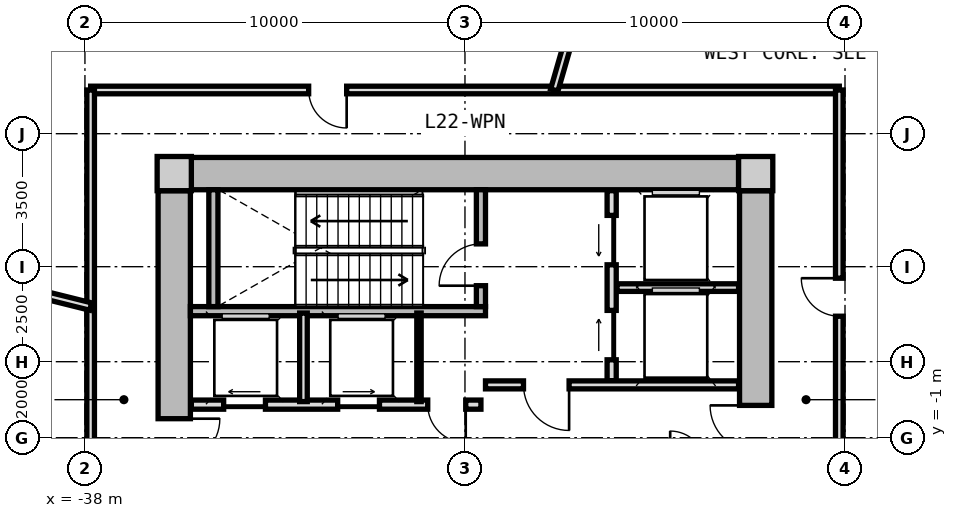
"""IFC4 building model, lengths in metres.
Left out: names, types, materials, properties, quantities, classifications, styles, units other than length and angle.
Written with IfcOpenShell. Run it as: python <this file> out.ifc"""

import sys

from ifc_helpers import new_model, si_unit, direction, frame, frame_2d, origin, origin_2d, place, context, subcontext, project, spatial, rectangle, extrude, source, transform, mapped, element, fill, save


model = new_model("IFC4")
c1 = context("Model", 3, precision=1e-05, world=origin(), true_north=direction((0.0, 1.0)))
c2 = subcontext(c1, "Body", "Model", "MODEL_VIEW")
j1 = project(units=[si_unit("LENGTHUNIT", "METRE"), si_unit("PLANEANGLEUNIT", "RADIAN")], contexts=[c1])
p1 = place(None, origin())
s1 = spatial("IfcSite", under=j1, at=p1, CompositionType="ELEMENT")
p2 = place(p1, origin())
s2 = spatial("IfcBuilding", under=s1, at=p2, CompositionType="ELEMENT")
p3 = place(p2, frame((0.0, 0.0, 73.45)))
s3 = spatial("IfcBuildingStorey", under=s2, at=p3, CompositionType="ELEMENT", Elevation=73.45)
m1 = source(origin(), c2, "Body", "SweptSolid", [
    extrude(rectangle(XDim=0.9, YDim=0.9, at=origin_2d()), origin(), (0.0, 0.0, 1.0), 4.5),
])
for number, where, z_axis, x_axis in (
    (1, (-20.35, 5.95, 0.0), (0.0, 0.0, 1.0), (1.0, 0.0, 0.0)),
    (2, (-35.65, 5.95, 0.0), (0.0, 0.0, 1.0), (1.0, 0.0, 0.0)),
):
    element("IfcColumn", number, at=place(p3, frame(where, z_axis=z_axis, x_axis=x_axis)), inside=s3, PredefinedType="COLUMN", context=c2, shape_type="MappedRepresentation", body=[
        mapped(m1, transform((0.0, 0.0, 0.0), x_axis=(1.0, 0.0, 0.0), y_axis=(0.0, 1.0, 0.0), z_axis=(0.0, 0.0, 1.0), scale=1.0)),
    ])
m2 = source(origin(), c2, "Body", "SweptSolid", [
    extrude(rectangle(XDim=14.4, YDim=0.85, at=frame_2d((7.2, 0.0))), origin(), (0.0, 0.0, 1.0), 4.08),
])
p4 = place(p3, frame((-35.2, 5.95, 0.0), z_axis=(0.0, 0.0, 1.0), x_axis=(1.0, 0.0, 0.0)))
e3 = element("IfcWall", 3, at=p4, inside=s3, PredefinedType="SHEAR", context=c2, shape_type="MappedRepresentation", body=[
    mapped(m2, transform((0.0, 0.0, 0.0), x_axis=(1.0, 0.0, 0.0), y_axis=(0.0, 1.0, 0.0), z_axis=(0.0, 0.0, 1.0), scale=1.0)),
])
m3 = source(origin(), c2, "Body", "SweptSolid", [
    extrude(rectangle(XDim=11.0, YDim=0.85, at=frame_2d((5.5, 0.0))), origin(), (0.0, 0.0, 1.0), 4.08),
])
p5 = place(p3, frame((-35.65, -5.5, 0.0), z_axis=(0.0, 0.0, 1.0), x_axis=(0.0, 1.0, 0.0)))
e4 = element("IfcWall", 4, at=p5, inside=s3, PredefinedType="SHEAR", context=c2, shape_type="MappedRepresentation", body=[
    mapped(m3, transform((0.0, 0.0, 0.0), x_axis=(1.0, 0.0, 0.0), y_axis=(0.0, 1.0, 0.0), z_axis=(0.0, 0.0, 1.0), scale=1.0)),
])
p6 = place(p5, frame((3.8, 0.0, 0.0)))
e5 = element("IfcOpeningElement", 5, at=p6, cuts=e4, PredefinedType="OPENING", context=c2, shape_type="SweptSolid", body=[
    extrude(rectangle(XDim=1.2, YDim=2.15, at=frame_2d((0.6, 1.075))), frame((0.0, 0.435, 0.0), z_axis=(0.0, -1.0, 0.0), x_axis=(1.0, 0.0, 0.0)), (0.0, 0.0, 1.0), 0.87),
])
p7 = place(p3, frame((-20.35, 5.5, 0.0), z_axis=(0.0, 0.0, 1.0), x_axis=(0.0, -1.0, 0.0)))
e6 = element("IfcWall", 6, at=p7, inside=s3, PredefinedType="SHEAR", context=c2, shape_type="MappedRepresentation", body=[
    mapped(m3, transform((0.0, 0.0, 0.0), x_axis=(1.0, 0.0, 0.0), y_axis=(0.0, 1.0, 0.0), z_axis=(0.0, 0.0, 1.0), scale=1.0)),
])
p8 = place(p7, frame((5.65, 0.0, 0.0)))
e7 = element("IfcOpeningElement", 7, at=p8, cuts=e6, PredefinedType="OPENING", context=c2, shape_type="SweptSolid", body=[
    extrude(rectangle(XDim=1.2, YDim=2.15, at=frame_2d((0.6, 1.075))), frame((0.0, 0.435, 0.0), z_axis=(0.0, -1.0, 0.0), x_axis=(1.0, 0.0, 0.0)), (0.0, 0.0, 1.0), 0.87),
])
p9 = place(p7, frame((9.3, 0.0, 0.0)))
e8 = element("IfcOpeningElement", 8, at=p9, cuts=e6, PredefinedType="OPENING", context=c2, shape_type="SweptSolid", body=[
    extrude(rectangle(XDim=1.0, YDim=2.1, at=frame_2d((0.5, 1.05))), frame((0.0, 0.435, 0.0), z_axis=(0.0, -1.0, 0.0), x_axis=(1.0, 0.0, 0.0)), (0.0, 0.0, 1.0), 0.87),
])
m4 = source(origin(), c2, "Body", "SweptSolid", [
    extrude(rectangle(XDim=7.765, YDim=0.24, at=frame_2d((3.883, 0.0))), origin(), (0.0, 0.0, 1.0), 4.08),
])
p10 = place(p3, frame((-35.225, 2.33, 0.0), z_axis=(0.0, 0.0, 1.0), x_axis=(1.0, 0.0, 0.0)))
e9 = element("IfcWall", 9, at=p10, inside=s3, PredefinedType="PARTITIONING", context=c2, shape_type="MappedRepresentation", body=[
    mapped(m4, transform((0.0, 0.0, 0.0), x_axis=(1.0, 0.0, 0.0), y_axis=(0.0, 1.0, 0.0), z_axis=(0.0, 0.0, 1.0), scale=1.0)),
])
m5 = source(origin(), c2, "Body", "SweptSolid", [
    extrude(rectangle(XDim=3.075, YDim=0.24, at=frame_2d((1.538, 0.0))), origin(), (0.0, 0.0, 1.0), 4.08),
])
p11 = place(p3, frame((-34.62, 2.45, 0.0), z_axis=(0.0, 0.0, 1.0), x_axis=(0.0, 1.0, 0.0)))
e10 = element("IfcWall", 10, at=p11, inside=s3, PredefinedType="PARTITIONING", context=c2, shape_type="MappedRepresentation", body=[
    mapped(m5, transform((0.0, 0.0, 0.0), x_axis=(1.0, 0.0, 0.0), y_axis=(0.0, 1.0, 0.0), z_axis=(0.0, 0.0, 1.0), scale=1.0)),
])
p12 = place(p3, frame((-27.58, 2.45, 0.0), z_axis=(0.0, 0.0, 1.0), x_axis=(0.0, 1.0, 0.0)))
e11 = element("IfcWall", 11, at=p12, inside=s3, PredefinedType="PARTITIONING", context=c2, shape_type="MappedRepresentation", body=[
    mapped(m5, transform((0.0, 0.0, 0.0), x_axis=(1.0, 0.0, 0.0), y_axis=(0.0, 1.0, 0.0), z_axis=(0.0, 0.0, 1.0), scale=1.0)),
])
p13 = place(p12, frame((0.55, 0.0, 0.0)))
e12 = element("IfcOpeningElement", 12, at=p13, cuts=e11, PredefinedType="OPENING", context=c2, shape_type="SweptSolid", body=[
    extrude(rectangle(XDim=1.1, YDim=2.15, at=frame_2d((0.55, 1.075))), frame((0.0, 0.13, 0.0), z_axis=(0.0, -1.0, 0.0), x_axis=(1.0, 0.0, 0.0)), (0.0, 0.0, 1.0), 0.26),
])
m6 = source(origin(), c2, "Body", "SweptSolid", [
    extrude(rectangle(XDim=5.0, YDim=0.24, at=frame_2d((2.5, 0.0))), origin(), (0.0, 0.0, 1.0), 4.065),
])
p14 = place(p3, frame((-24.14, 0.5, 0.0), z_axis=(0.0, 0.0, 1.0), x_axis=(0.0, 1.0, 0.0)))
e13 = element("IfcWall", 13, at=p14, inside=s3, PredefinedType="PARTITIONING", context=c2, shape_type="MappedRepresentation", body=[
    mapped(m6, transform((0.0, 0.0, 0.0), x_axis=(1.0, 0.0, 0.0), y_axis=(0.0, 1.0, 0.0), z_axis=(0.0, 0.0, 1.0), scale=1.0)),
])
p15 = place(p14, frame((3.05, 0.0, 0.0)))
e14 = element("IfcOpeningElement", 14, at=p15, cuts=e13, PredefinedType="OPENING", context=c2, shape_type="SweptSolid", body=[
    extrude(rectangle(XDim=1.3, YDim=2.2, at=frame_2d((0.65, 1.1))), frame((0.0, 0.13, 0.0), z_axis=(0.0, -1.0, 0.0), x_axis=(1.0, 0.0, 0.0)), (0.0, 0.0, 1.0), 0.26),
])
p16 = place(p14, frame((0.55, 0.0, 0.0)))
e15 = element("IfcOpeningElement", 15, at=p16, cuts=e13, PredefinedType="OPENING", context=c2, shape_type="SweptSolid", body=[
    extrude(rectangle(XDim=1.3, YDim=2.2, at=frame_2d((0.65, 1.1))), frame((0.0, 0.13, 0.0), z_axis=(0.0, -1.0, 0.0), x_axis=(1.0, 0.0, 0.0)), (0.0, 0.0, 1.0), 0.26),
])
m7 = source(origin(), c2, "Body", "SweptSolid", [
    extrude(rectangle(XDim=3.2, YDim=0.2, at=frame_2d((1.6, 0.0))), origin(), (0.0, 0.0, 1.0), 4.065),
])
p17 = place(p3, frame((-24.0, 2.95, 0.0), z_axis=(0.0, 0.0, 1.0), x_axis=(1.0, 0.0, 0.0)))
e16 = element("IfcWall", 16, at=p17, inside=s3, PredefinedType="PARTITIONING", context=c2, shape_type="MappedRepresentation", body=[
    mapped(m7, transform((0.0, 0.0, 0.0), x_axis=(1.0, 0.0, 0.0), y_axis=(0.0, 1.0, 0.0), z_axis=(0.0, 0.0, 1.0), scale=1.0)),
])
m8 = source(origin(), c2, "Body", "SweptSolid", [
    extrude(rectangle(XDim=6.66, YDim=0.21, at=frame_2d((3.33, 0.0))), origin(), (0.0, 0.0, 1.0), 4.065),
])
p18 = place(p3, frame((-27.46, 0.39, 0.0), z_axis=(0.0, 0.0, 1.0), x_axis=(1.0, 0.0, 0.0)))
e17 = element("IfcWall", 17, at=p18, inside=s3, PredefinedType="PARTITIONING", context=c2, shape_type="MappedRepresentation", body=[
    mapped(m8, transform((0.0, 0.0, 0.0), x_axis=(1.0, 0.0, 0.0), y_axis=(0.0, 1.0, 0.0), z_axis=(0.0, 0.0, 1.0), scale=1.0)),
])
p19 = place(p18, frame((1.0, 0.0, 0.0)))
e18 = element("IfcOpeningElement", 18, at=p19, cuts=e17, PredefinedType="OPENING", context=c2, shape_type="SweptSolid", body=[
    extrude(rectangle(XDim=1.2, YDim=2.15, at=frame_2d((0.6, 1.075))), frame((0.0, 0.115, 0.0), z_axis=(0.0, -1.0, 0.0), x_axis=(1.0, 0.0, 0.0)), (0.0, 0.0, 1.0), 0.23),
])
m9 = source(origin(), c2, "Body", "SweptSolid", [
    extrude(rectangle(XDim=7.62, YDim=0.24, at=frame_2d((3.81, 0.0))), origin(), (0.0, 0.0, 1.0), 4.065),
])
p20 = place(p3, frame((-35.2, -0.13, 0.0), z_axis=(0.0, 0.0, 1.0), x_axis=(1.0, 0.0, 0.0)))
e19 = element("IfcWall", 19, at=p20, inside=s3, PredefinedType="PARTITIONING", context=c2, shape_type="MappedRepresentation", body=[
    mapped(m9, transform((0.0, 0.0, 0.0), x_axis=(1.0, 0.0, 0.0), y_axis=(0.0, 1.0, 0.0), z_axis=(0.0, 0.0, 1.0), scale=1.0)),
])
p21 = place(p20, frame((6.22, 0.0, 0.0)))
e20 = element("IfcOpeningElement", 20, at=p21, cuts=e19, PredefinedType="OPENING", context=c2, shape_type="SweptSolid", body=[
    extrude(rectangle(XDim=1.0, YDim=2.1, at=frame_2d((0.5, 1.05))), frame((0.0, 0.13, 0.0), z_axis=(0.0, -1.0, 0.0), x_axis=(1.0, 0.0, 0.0)), (0.0, 0.0, 1.0), 0.26),
])
p22 = place(p20, frame((0.85, 0.0, 0.0)))
e21 = element("IfcOpeningElement", 21, at=p22, cuts=e19, PredefinedType="OPENING", context=c2, shape_type="SweptSolid", body=[
    extrude(rectangle(XDim=1.1, YDim=2.2, at=frame_2d((0.55, 1.1))), frame((0.0, 0.13, 0.0), z_axis=(0.0, -1.0, 0.0), x_axis=(1.0, 0.0, 0.0)), (0.0, 0.0, 1.0), 0.26),
])
p23 = place(p20, frame((3.85, 0.0, 0.0)))
e22 = element("IfcOpeningElement", 22, at=p23, cuts=e19, PredefinedType="OPENING", context=c2, shape_type="SweptSolid", body=[
    extrude(rectangle(XDim=1.1, YDim=2.2, at=frame_2d((0.55, 1.1))), frame((0.0, 0.13, 0.0), z_axis=(0.0, -1.0, 0.0), x_axis=(1.0, 0.0, 0.0)), (0.0, 0.0, 1.0), 0.26),
])
m10 = source(origin(), c2, "Body", "SweptSolid", [
    extrude(rectangle(XDim=2.33, YDim=0.115, at=frame_2d((1.165, 0.0))), origin(), (0.0, 0.0, 1.0), 4.065),
])
p24 = place(p3, frame((-29.21, -0.05, 0.0), z_axis=(0.0, 0.0, 1.0), x_axis=(0.0, 1.0, 0.0)))
e23 = element("IfcWall", 23, at=p24, inside=s3, PredefinedType="PARTITIONING", context=c2, shape_type="MappedRepresentation", body=[
    mapped(m10, transform((0.0, 0.0, 0.0), x_axis=(1.0, 0.0, 0.0), y_axis=(0.0, 1.0, 0.0), z_axis=(0.0, 0.0, 1.0), scale=1.0)),
])
m11 = source(origin(), c2, "Body", "SweptSolid", [
    extrude(rectangle(XDim=2.33, YDim=0.2, at=frame_2d((1.165, 0.0))), origin(), (0.0, 0.0, 1.0), 4.065),
])
p25 = place(p3, frame((-32.25, -0.05, 0.0), z_axis=(0.0, 0.0, 1.0), x_axis=(0.0, 1.0, 0.0)))
e24 = element("IfcWall", 24, at=p25, inside=s3, PredefinedType="PARTITIONING", context=c2, shape_type="MappedRepresentation", body=[
    mapped(m11, transform((0.0, 0.0, 0.0), x_axis=(1.0, 0.0, 0.0), y_axis=(0.0, 1.0, 0.0), z_axis=(0.0, 0.0, 1.0), scale=1.0)),
])
m12 = source(origin(), c2, "Body", "SweptSolid", [
    extrude(rectangle(XDim=19.7, YDim=0.2, at=frame_2d((9.85, 0.0))), origin(), (0.0, 0.0, 1.0), 4.065),
])
p26 = place(p3, frame((-37.85, 8.15, 0.0), z_axis=(0.0, 0.0, 1.0), x_axis=(1.0, 0.0, 0.0)))
e25 = element("IfcWall", 25, at=p26, inside=s3, PredefinedType="PARTITIONING", context=c2, shape_type="MappedRepresentation", body=[
    mapped(m12, transform((0.0, 0.0, 0.0), x_axis=(1.0, 0.0, 0.0), y_axis=(0.0, 1.0, 0.0), z_axis=(0.0, 0.0, 1.0), scale=1.0)),
])
p27 = place(p26, frame((5.737, 0.0, 0.0)))
e26 = element("IfcOpeningElement", 26, at=p27, cuts=e25, PredefinedType="OPENING", context=c2, shape_type="SweptSolid", body=[
    extrude(rectangle(XDim=1.0, YDim=2.1, at=frame_2d((0.5, 1.05))), frame((0.0, 0.11, 0.0), z_axis=(0.0, -1.0, 0.0), x_axis=(1.0, 0.0, 0.0)), (0.0, 0.0, 1.0), 0.22),
])
m13 = source(origin(), c2, "Body", "SweptSolid", [
    extrude(rectangle(XDim=16.3, YDim=0.2, at=frame_2d((8.15, 0.0))), origin(), (0.0, 0.0, 1.0), 4.065),
])
p28 = place(p3, frame((-37.85, -8.15, 0.0), z_axis=(0.0, 0.0, 1.0), x_axis=(0.0, 1.0, 0.0)))
e27 = element("IfcWall", 27, at=p28, inside=s3, PredefinedType="PARTITIONING", context=c2, shape_type="MappedRepresentation", body=[
    mapped(m13, transform((0.0, 0.0, 0.0), x_axis=(1.0, 0.0, 0.0), y_axis=(0.0, 1.0, 0.0), z_axis=(0.0, 0.0, 1.0), scale=1.0)),
])
p29 = place(p28, frame((4.953, 0.0, 0.0)))
e28 = element("IfcOpeningElement", 28, at=p29, cuts=e27, PredefinedType="OPENING", context=c2, shape_type="SweptSolid", body=[
    extrude(rectangle(XDim=1.0, YDim=2.1, at=frame_2d((0.5, 1.05))), frame((0.0, 0.11, 0.0), z_axis=(0.0, -1.0, 0.0), x_axis=(1.0, 0.0, 0.0)), (0.0, 0.0, 1.0), 0.22),
])
p30 = place(p3, frame((-18.15, 8.15, 0.0), z_axis=(0.0, 0.0, 1.0), x_axis=(0.0, -1.0, 0.0)))
e29 = element("IfcWall", 29, at=p30, inside=s3, PredefinedType="PARTITIONING", context=c2, shape_type="MappedRepresentation", body=[
    mapped(m13, transform((0.0, 0.0, 0.0), x_axis=(1.0, 0.0, 0.0), y_axis=(0.0, 1.0, 0.0), z_axis=(0.0, 0.0, 1.0), scale=1.0)),
])
p31 = place(p30, frame((4.953, 0.0, 0.0)))
e30 = element("IfcOpeningElement", 30, at=p31, cuts=e29, PredefinedType="OPENING", context=c2, shape_type="SweptSolid", body=[
    extrude(rectangle(XDim=1.0, YDim=2.1, at=frame_2d((0.5, 1.05))), frame((0.0, 0.11, 0.0), z_axis=(0.0, -1.0, 0.0), x_axis=(1.0, 0.0, 0.0)), (0.0, 0.0, 1.0), 0.22),
])
m14 = source(origin(), c2, "Body", "SweptSolid", [
    extrude(rectangle(XDim=9.915, YDim=0.2, at=frame_2d((4.958, 0.0))), origin(), (0.0, 0.0, 1.0), 4.065),
])
p32 = place(p3, frame((-25.649, 8.15, 0.0), z_axis=(0.0, 0.0, 1.0), x_axis=(0.277136607861, 0.960830526463, 0.0)))
e31 = element("IfcWall", 31, at=p32, inside=s3, PredefinedType="PARTITIONING", context=c2, shape_type="MappedRepresentation", body=[
    mapped(m14, transform((0.0, 0.0, 0.0), x_axis=(1.0, 0.0, 0.0), y_axis=(0.0, 1.0, 0.0), z_axis=(0.0, 0.0, 1.0), scale=1.0)),
])
m15 = source(origin(), c2, "Body", "SweptSolid", [
    extrude(rectangle(XDim=9.459, YDim=0.2, at=frame_2d((4.729, 0.0))), origin(), (0.0, 0.0, 1.0), 2.515),
])
p33 = place(p3, frame((-37.85, 2.452, 0.0), z_axis=(0.0, 0.0, 1.0), x_axis=(-0.970390989268, 0.241539495626, 0.0)))
e32 = element("IfcWall", 32, at=p33, inside=s3, PredefinedType="PARTITIONING", context=c2, shape_type="MappedRepresentation", body=[
    mapped(m15, transform((0.0, 0.0, 0.0), x_axis=(1.0, 0.0, 0.0), y_axis=(0.0, 1.0, 0.0), z_axis=(0.0, 0.0, 1.0), scale=1.0)),
])
m16 = source(origin(), c2, "Body", "SweptSolid", [
    extrude(rectangle(XDim=1.1, YDim=2.15, at=frame_2d((0.55, 1.075))), frame((0.0, 0.025, 0.0), z_axis=(0.0, -1.0, 0.0), x_axis=(1.0, 0.0, 0.0)), (0.0, 0.0, 1.0), 0.05),
])
p34 = place(p13, origin())
e33 = element("IfcDoor", 33, at=p34, inside=s3, OperationType="SINGLE_SWING_LEFT", PredefinedType="DOOR", context=c2, shape_type="MappedRepresentation", body=[
    mapped(m16, transform((0.0, 0.0, 0.0), x_axis=(1.0, 0.0, 0.0), y_axis=(0.0, 1.0, 0.0), z_axis=(0.0, 0.0, 1.0), scale=1.0)),
])
fill(e12, e33)
m17 = source(origin(), c2, "Body", "SweptSolid", [
    extrude(rectangle(XDim=1.3, YDim=2.2, at=frame_2d((0.65, 1.1))), frame((0.0, 0.025, 0.0), z_axis=(0.0, -1.0, 0.0), x_axis=(1.0, 0.0, 0.0)), (0.0, 0.0, 1.0), 0.05),
])
p35 = place(p15, origin())
e34 = element("IfcDoor", 34, at=p35, inside=s3, OperationType="SLIDING_TO_LEFT", PredefinedType="DOOR", context=c2, shape_type="MappedRepresentation", body=[
    mapped(m17, transform((0.0, 0.0, 0.0), x_axis=(1.0, 0.0, 0.0), y_axis=(0.0, 1.0, 0.0), z_axis=(0.0, 0.0, 1.0), scale=1.0)),
])
fill(e14, e34)
p36 = place(p16, origin())
e35 = element("IfcDoor", 35, at=p36, inside=s3, OperationType="SLIDING_TO_RIGHT", PredefinedType="DOOR", context=c2, shape_type="MappedRepresentation", body=[
    mapped(m17, transform((0.0, 0.0, 0.0), x_axis=(1.0, 0.0, 0.0), y_axis=(0.0, 1.0, 0.0), z_axis=(0.0, 0.0, 1.0), scale=1.0)),
])
fill(e15, e35)
m18 = source(origin(), c2, "Body", "SweptSolid", [
    extrude(rectangle(XDim=1.2, YDim=2.15, at=frame_2d((0.6, 1.075))), frame((0.0, 0.025, 0.0), z_axis=(0.0, -1.0, 0.0), x_axis=(1.0, 0.0, 0.0)), (0.0, 0.0, 1.0), 0.05),
])
p37 = place(p19, frame((1.2, 0.0, 0.0), z_axis=(0.0, 0.0, 1.0), x_axis=(-1.0, 0.0, 0.0)))
e36 = element("IfcDoor", 36, at=p37, inside=s3, OperationType="SINGLE_SWING_LEFT", PredefinedType="DOOR", context=c2, shape_type="MappedRepresentation", body=[
    mapped(m18, transform((0.0, 0.0, 0.0), x_axis=(1.0, 0.0, 0.0), y_axis=(0.0, 1.0, 0.0), z_axis=(0.0, 0.0, 1.0), scale=1.0)),
])
fill(e18, e36)
p38 = place(p6, frame((1.2, 0.0, 0.0), z_axis=(0.0, 0.0, 1.0), x_axis=(-1.0, 0.0, 0.0)))
e37 = element("IfcDoor", 37, at=p38, inside=s3, OperationType="SINGLE_SWING_LEFT", PredefinedType="DOOR", context=c2, shape_type="MappedRepresentation", body=[
    mapped(m18, transform((0.0, 0.0, 0.0), x_axis=(1.0, 0.0, 0.0), y_axis=(0.0, 1.0, 0.0), z_axis=(0.0, 0.0, 1.0), scale=1.0)),
])
fill(e5, e37)
p39 = place(p8, frame((1.2, 0.0, 0.0), z_axis=(0.0, 0.0, 1.0), x_axis=(-1.0, 0.0, 0.0)))
e38 = element("IfcDoor", 38, at=p39, inside=s3, OperationType="SINGLE_SWING_RIGHT", PredefinedType="DOOR", context=c2, shape_type="MappedRepresentation", body=[
    mapped(m18, transform((0.0, 0.0, 0.0), x_axis=(1.0, 0.0, 0.0), y_axis=(0.0, 1.0, 0.0), z_axis=(0.0, 0.0, 1.0), scale=1.0)),
])
fill(e7, e38)
m19 = source(origin(), c2, "Body", "SweptSolid", [
    extrude(rectangle(XDim=1.0, YDim=2.1, at=frame_2d((0.5, 1.05))), frame((0.0, 0.025, 0.0), z_axis=(0.0, -1.0, 0.0), x_axis=(1.0, 0.0, 0.0)), (0.0, 0.0, 1.0), 0.05),
])
p40 = place(p21, frame((1.0, 0.0, 0.0), z_axis=(0.0, 0.0, 1.0), x_axis=(-1.0, 0.0, 0.0)))
e39 = element("IfcDoor", 39, at=p40, inside=s3, OperationType="SINGLE_SWING_LEFT", PredefinedType="DOOR", context=c2, shape_type="MappedRepresentation", body=[
    mapped(m19, transform((0.0, 0.0, 0.0), x_axis=(1.0, 0.0, 0.0), y_axis=(0.0, 1.0, 0.0), z_axis=(0.0, 0.0, 1.0), scale=1.0)),
])
fill(e20, e39)
m20 = source(origin(), c2, "Body", "SweptSolid", [
    extrude(rectangle(XDim=1.1, YDim=2.2, at=frame_2d((0.55, 1.1))), frame((0.0, 0.025, 0.0), z_axis=(0.0, -1.0, 0.0), x_axis=(1.0, 0.0, 0.0)), (0.0, 0.0, 1.0), 0.05),
])
p41 = place(p22, origin())
e40 = element("IfcDoor", 40, at=p41, inside=s3, OperationType="SLIDING_TO_LEFT", PredefinedType="DOOR", context=c2, shape_type="MappedRepresentation", body=[
    mapped(m20, transform((0.0, 0.0, 0.0), x_axis=(1.0, 0.0, 0.0), y_axis=(0.0, 1.0, 0.0), z_axis=(0.0, 0.0, 1.0), scale=1.0)),
])
fill(e21, e40)
p42 = place(p23, origin())
e41 = element("IfcDoor", 41, at=p42, inside=s3, OperationType="SLIDING_TO_RIGHT", PredefinedType="DOOR", context=c2, shape_type="MappedRepresentation", body=[
    mapped(m20, transform((0.0, 0.0, 0.0), x_axis=(1.0, 0.0, 0.0), y_axis=(0.0, 1.0, 0.0), z_axis=(0.0, 0.0, 1.0), scale=1.0)),
])
fill(e22, e41)
p43 = place(p31, frame((1.0, 0.0, 0.0), z_axis=(0.0, 0.0, 1.0), x_axis=(-1.0, 0.0, 0.0)))
e42 = element("IfcDoor", 42, at=p43, inside=s3, OperationType="SINGLE_SWING_RIGHT", PredefinedType="DOOR", context=c2, shape_type="MappedRepresentation", body=[
    mapped(m19, transform((0.0, 0.0, 0.0), x_axis=(1.0, 0.0, 0.0), y_axis=(0.0, 1.0, 0.0), z_axis=(0.0, 0.0, 1.0), scale=1.0)),
])
fill(e30, e42)
p44 = place(p27, frame((1.0, 0.0, 0.0), z_axis=(0.0, 0.0, 1.0), x_axis=(-1.0, 0.0, 0.0)))
e43 = element("IfcDoor", 43, at=p44, inside=s3, OperationType="SINGLE_SWING_LEFT", PredefinedType="DOOR", context=c2, shape_type="MappedRepresentation", body=[
    mapped(m19, transform((0.0, 0.0, 0.0), x_axis=(1.0, 0.0, 0.0), y_axis=(0.0, 1.0, 0.0), z_axis=(0.0, 0.0, 1.0), scale=1.0)),
])
fill(e26, e43)
save(model, sys.argv[1])
